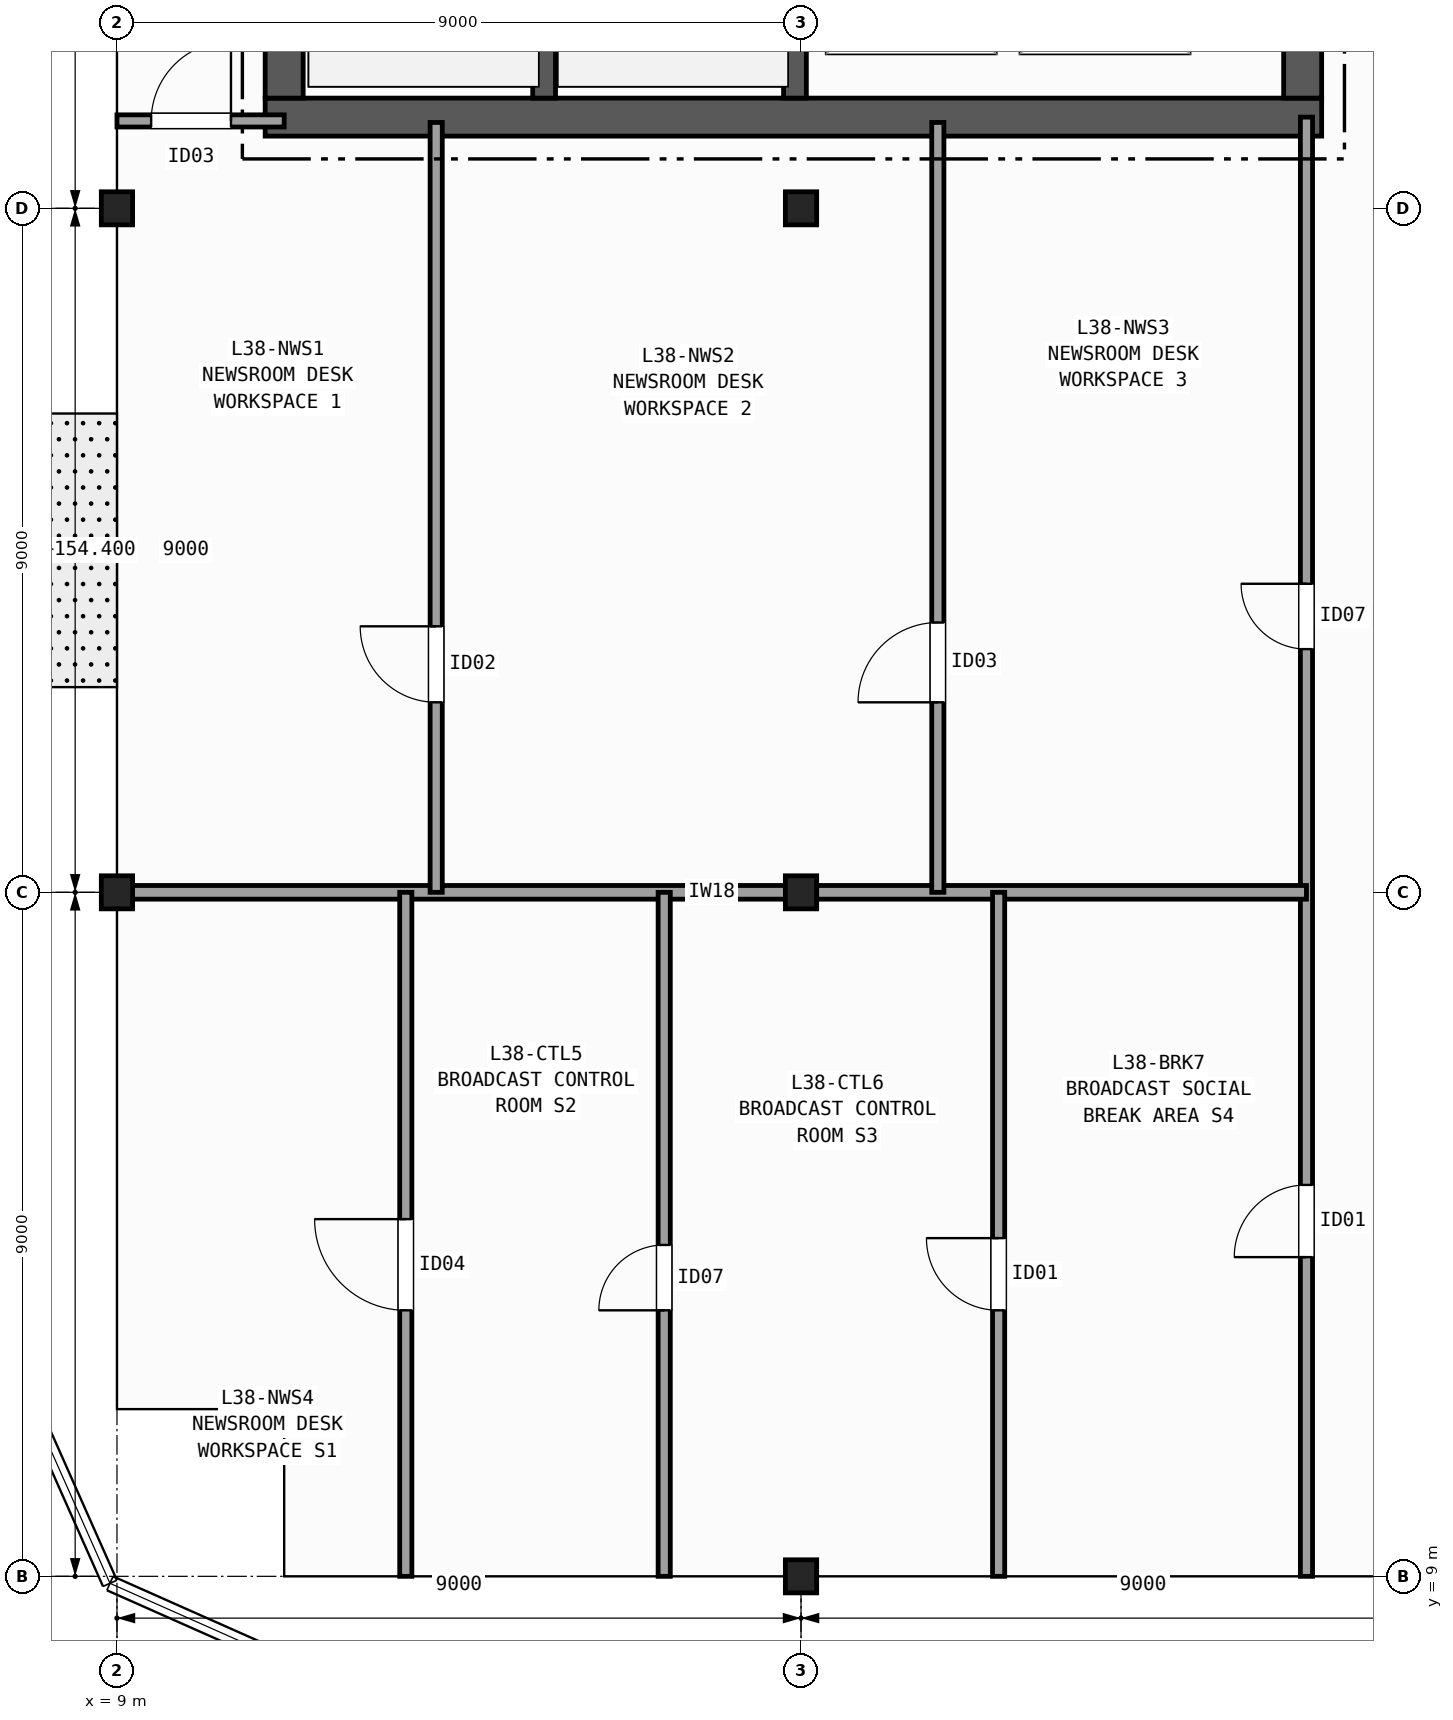
"""IFC4 building model, lengths in metres.
Left out: names, types, materials, properties, quantities, classifications, styles, units other than length and angle.
Written with IfcOpenShell. Run it as: python <this file> out.ifc"""

import sys

from ifc_helpers import new_model, si_unit, direction, frame, frame_2d, origin, origin_2d, place, context, subcontext, project, spatial, rectangle, i_section, extrude, element, fill, save


model = new_model("IFC4")
c1 = context("Model", 3, precision=1e-05, world=origin(), true_north=direction((0.0, 1.0)))
c2 = subcontext(c1, "Body", "Model", "MODEL_VIEW")
j1 = project(units=[si_unit("LENGTHUNIT", "METRE"), si_unit("PLANEANGLEUNIT", "RADIAN")], contexts=[c1])
p1 = place(None, origin())
s1 = spatial("IfcSite", under=j1, at=p1, CompositionType="ELEMENT")
p2 = place(p1, origin())
s2 = spatial("IfcBuilding", under=s1, at=p2, CompositionType="ELEMENT")
p3 = place(p2, frame((0.0, 0.0, 154.4)))
s3 = spatial("IfcBuildingStorey", under=s2, at=p3, CompositionType="ELEMENT", Elevation=154.4)
for number, where, z_axis, x_axis in (
    (1, (9.0, 18.0, 0.0), (0.0, 0.0, 1.0), (1.0, 0.0, 0.0)),
    (2, (9.0, 27.0, 0.0), (0.0, 0.0, 1.0), (1.0, 0.0, 0.0)),
    (3, (18.0, 9.0, 0.0), (0.0, 0.0, 1.0), (1.0, 0.0, 0.0)),
    (4, (18.0, 18.0, 0.0), (0.0, 0.0, 1.0), (1.0, 0.0, 0.0)),
    (5, (18.0, 27.0, 0.0), (0.0, 0.0, 1.0), (1.0, 0.0, 0.0)),
):
    element("IfcColumn", number, at=place(p3, frame(where, z_axis=z_axis, x_axis=x_axis)), inside=s3, PredefinedType="COLUMN", context=c2, shape_type="SweptSolid", body=[
        extrude(i_section(OverallWidth=0.412, OverallDepth=0.435, WebThickness=0.036, FlangeThickness=0.057, FilletRadius=0.015, at=origin_2d()), origin(), (0.0, 0.0, 1.0), 3.7),
    ])
p4 = place(p3, frame((10.95, 28.2, 0.0), z_axis=(0.0, 0.0, 1.0), x_axis=(1.0, 0.0, 0.0)))
e6 = element("IfcWall", 6, at=p4, inside=s3, PredefinedType="SHEAR", context=c2, shape_type="SweptSolid", body=[
    extrude(rectangle(XDim=13.9, YDim=0.5, at=frame_2d((6.95, 0.0))), origin(), (0.0, 0.0, 1.0), 3.42),
])
p5 = place(p3, frame((11.2, 42.15, 0.0), z_axis=(0.0, 0.0, 1.0), x_axis=(0.0, -1.0, 0.0)))
e7 = element("IfcWall", 7, at=p5, inside=s3, PredefinedType="SHEAR", context=c2, shape_type="SweptSolid", body=[
    extrude(rectangle(XDim=13.7, YDim=0.5, at=frame_2d((6.85, 0.0))), origin(), (0.0, 0.0, 1.0), 3.42),
])
p6 = place(p3, frame((24.6, 28.45, 0.0), z_axis=(0.0, 0.0, 1.0), x_axis=(0.0, 1.0, 0.0)))
e8 = element("IfcWall", 8, at=p6, inside=s3, PredefinedType="SHEAR", context=c2, shape_type="SweptSolid", body=[
    extrude(rectangle(XDim=13.7, YDim=0.5, at=frame_2d((6.85, 0.0))), origin(), (0.0, 0.0, 1.0), 3.42),
])
p7 = place(p6, frame((3.35, 0.0, 0.0)))
e9 = element("IfcOpeningElement", 9, at=p7, cuts=e8, PredefinedType="OPENING", context=c2, shape_type="SweptSolid", body=[
    extrude(rectangle(XDim=1.5, YDim=2.2, at=frame_2d((0.75, 1.1))), frame((0.0, 0.26, 0.0), z_axis=(0.0, -1.0, 0.0), x_axis=(1.0, 0.0, 0.0)), (0.0, 0.0, 1.0), 0.52),
])
p8 = place(p6, frame((9.95, 0.0, 0.0)))
e10 = element("IfcOpeningElement", 10, at=p8, cuts=e8, PredefinedType="OPENING", context=c2, shape_type="SweptSolid", body=[
    extrude(rectangle(XDim=0.9, YDim=2.1, at=frame_2d((0.45, 1.05))), frame((0.0, 0.26, 0.0), z_axis=(0.0, -1.0, 0.0), x_axis=(1.0, 0.0, 0.0)), (0.0, 0.0, 1.0), 0.52),
])
p9 = place(p6, frame((12.05, 0.0, 0.0)))
e11 = element("IfcOpeningElement", 11, at=p9, cuts=e8, PredefinedType="OPENING", context=c2, shape_type="SweptSolid", body=[
    extrude(rectangle(XDim=0.9, YDim=2.1, at=frame_2d((0.45, 1.05))), frame((0.0, 0.26, 0.0), z_axis=(0.0, -1.0, 0.0), x_axis=(1.0, 0.0, 0.0)), (0.0, 0.0, 1.0), 0.52),
])
p10 = place(p3, frame((14.62, 28.45, 0.0), z_axis=(0.0, 0.0, 1.0), x_axis=(0.0, 1.0, 0.0)))
e12 = element("IfcWall", 12, at=p10, inside=s3, PredefinedType="SHEAR", context=c2, shape_type="SweptSolid", body=[
    extrude(rectangle(XDim=9.0, YDim=0.3, at=frame_2d((4.5, 0.0))), origin(), (0.0, 0.0, 1.0), 3.42),
])
p11 = place(p3, frame((17.92, 42.15, 0.0), z_axis=(0.0, 0.0, 1.0), x_axis=(0.0, -1.0, 0.0)))
e13 = element("IfcWall", 13, at=p11, inside=s3, PredefinedType="SHEAR", context=c2, shape_type="SweptSolid", body=[
    extrude(rectangle(XDim=13.7, YDim=0.3, at=frame_2d((6.85, 0.0))), origin(), (0.0, 0.0, 1.0), 3.42),
])
p12 = place(p11, frame((1.975, 0.0, 0.0)))
e14 = element("IfcOpeningElement", 14, at=p12, cuts=e13, PredefinedType="OPENING", context=c2, shape_type="SweptSolid", body=[
    extrude(rectangle(XDim=1.15, YDim=2.15, at=frame_2d((0.575, 1.075))), frame((0.0, 0.16, 0.0), z_axis=(0.0, -1.0, 0.0), x_axis=(1.0, 0.0, 0.0)), (0.0, 0.0, 1.0), 0.32),
])
p13 = place(p3, frame((9.0, 28.15, 0.0), z_axis=(0.0, 0.0, 1.0), x_axis=(1.0, 0.0, 0.0)))
e15 = element("IfcWall", 15, at=p13, inside=s3, PredefinedType="PARTITIONING", context=c2, shape_type="SweptSolid", body=[
    extrude(rectangle(XDim=2.2, YDim=0.16, at=frame_2d((1.1, 0.0))), origin(), (0.0, 0.0, 1.0), 2.634),
])
p14 = place(p13, frame((0.45, 0.0, 0.0)))
e16 = element("IfcOpeningElement", 16, at=p14, cuts=e15, PredefinedType="OPENING", context=c2, shape_type="SweptSolid", body=[
    extrude(rectangle(XDim=1.05, YDim=2.15, at=frame_2d((0.525, 1.075))), frame((0.0, 0.09, 0.0), z_axis=(0.0, -1.0, 0.0), x_axis=(1.0, 0.0, 0.0)), (0.0, 0.0, 1.0), 0.18),
])
p15 = place(p3, frame((24.65, 9.0, 0.0), z_axis=(0.0, 0.0, 1.0), x_axis=(0.0, 1.0, 0.0)))
e17 = element("IfcWall", 17, at=p15, inside=s3, PredefinedType="PARTITIONING", context=c2, shape_type="SweptSolid", body=[
    extrude(rectangle(XDim=19.2, YDim=0.16, at=frame_2d((9.6, 0.0))), origin(), (0.0, 0.0, 1.0), 2.634),
])
p16 = place(p15, frame((12.2, 0.0, 0.0)))
e18 = element("IfcOpeningElement", 18, at=p16, cuts=e17, PredefinedType="OPENING", context=c2, shape_type="SweptSolid", body=[
    extrude(rectangle(XDim=0.86, YDim=2.05, at=frame_2d((0.43, 1.025))), frame((0.0, 0.09, 0.0), z_axis=(0.0, -1.0, 0.0), x_axis=(1.0, 0.0, 0.0)), (0.0, 0.0, 1.0), 0.18),
])
p17 = place(p15, frame((4.2, 0.0, 0.0)))
e19 = element("IfcOpeningElement", 19, at=p17, cuts=e17, PredefinedType="OPENING", context=c2, shape_type="SweptSolid", body=[
    extrude(rectangle(XDim=0.95, YDim=2.1, at=frame_2d((0.475, 1.05))), frame((0.0, 0.09, 0.0), z_axis=(0.0, -1.0, 0.0), x_axis=(1.0, 0.0, 0.0)), (0.0, 0.0, 1.0), 0.18),
])
p18 = place(p3, frame((9.0, 18.0, 0.0), z_axis=(0.0, 0.0, 1.0), x_axis=(1.0, 0.0, 0.0)))
e20 = element("IfcWall", 20, at=p18, inside=s3, PredefinedType="PARTITIONING", context=c2, shape_type="SweptSolid", body=[
    extrude(rectangle(XDim=15.65, YDim=0.18, at=frame_2d((7.825, 0.0))), origin(), (0.0, 0.0, 1.0), 2.634),
])
p19 = place(p3, frame((13.2, 18.0, 0.0), z_axis=(0.0, 0.0, 1.0), x_axis=(0.0, 1.0, 0.0)))
e21 = element("IfcWall", 21, at=p19, inside=s3, PredefinedType="PARTITIONING", context=c2, shape_type="SweptSolid", body=[
    extrude(rectangle(XDim=10.13, YDim=0.16, at=frame_2d((5.065, 0.0))), origin(), (0.0, 0.0, 1.0), 2.789),
])
p20 = place(p19, frame((2.5, 0.0, 0.0)))
e22 = element("IfcOpeningElement", 22, at=p20, cuts=e21, PredefinedType="OPENING", context=c2, shape_type="SweptSolid", body=[
    extrude(rectangle(XDim=1.0, YDim=2.1, at=frame_2d((0.5, 1.05))), frame((0.0, 0.09, 0.0), z_axis=(0.0, -1.0, 0.0), x_axis=(1.0, 0.0, 0.0)), (0.0, 0.0, 1.0), 0.18),
])
p21 = place(p3, frame((19.8, 18.0, 0.0), z_axis=(0.0, 0.0, 1.0), x_axis=(0.0, 1.0, 0.0)))
e23 = element("IfcWall", 23, at=p21, inside=s3, PredefinedType="PARTITIONING", context=c2, shape_type="SweptSolid", body=[
    extrude(rectangle(XDim=10.13, YDim=0.16, at=frame_2d((5.065, 0.0))), origin(), (0.0, 0.0, 1.0), 2.789),
])
p22 = place(p21, frame((2.5, 0.0, 0.0)))
e24 = element("IfcOpeningElement", 24, at=p22, cuts=e23, PredefinedType="OPENING", context=c2, shape_type="SweptSolid", body=[
    extrude(rectangle(XDim=1.05, YDim=2.15, at=frame_2d((0.525, 1.075))), frame((0.0, 0.09, 0.0), z_axis=(0.0, -1.0, 0.0), x_axis=(1.0, 0.0, 0.0)), (0.0, 0.0, 1.0), 0.18),
])
p23 = place(p3, frame((12.8, 9.0, 0.0), z_axis=(0.0, 0.0, 1.0), x_axis=(0.0, 1.0, 0.0)))
e25 = element("IfcWall", 25, at=p23, inside=s3, PredefinedType="PARTITIONING", context=c2, shape_type="SweptSolid", body=[
    extrude(rectangle(XDim=9.0, YDim=0.16, at=frame_2d((4.5, 0.0))), origin(), (0.0, 0.0, 1.0), 2.789),
])
p24 = place(p23, frame((3.5, 0.0, 0.0)))
e26 = element("IfcOpeningElement", 26, at=p24, cuts=e25, PredefinedType="OPENING", context=c2, shape_type="SweptSolid", body=[
    extrude(rectangle(XDim=1.2, YDim=2.15, at=frame_2d((0.6, 1.075))), frame((0.0, 0.09, 0.0), z_axis=(0.0, -1.0, 0.0), x_axis=(1.0, 0.0, 0.0)), (0.0, 0.0, 1.0), 0.18),
])
p25 = place(p3, frame((16.2, 9.0, 0.0), z_axis=(0.0, 0.0, 1.0), x_axis=(0.0, 1.0, 0.0)))
e27 = element("IfcWall", 27, at=p25, inside=s3, PredefinedType="PARTITIONING", context=c2, shape_type="SweptSolid", body=[
    extrude(rectangle(XDim=9.0, YDim=0.16, at=frame_2d((4.5, 0.0))), origin(), (0.0, 0.0, 1.0), 2.789),
])
p26 = place(p25, frame((3.5, 0.0, 0.0)))
e28 = element("IfcOpeningElement", 28, at=p26, cuts=e27, PredefinedType="OPENING", context=c2, shape_type="SweptSolid", body=[
    extrude(rectangle(XDim=0.86, YDim=2.05, at=frame_2d((0.43, 1.025))), frame((0.0, 0.09, 0.0), z_axis=(0.0, -1.0, 0.0), x_axis=(1.0, 0.0, 0.0)), (0.0, 0.0, 1.0), 0.18),
])
p27 = place(p3, frame((20.6, 9.0, 0.0), z_axis=(0.0, 0.0, 1.0), x_axis=(0.0, 1.0, 0.0)))
e29 = element("IfcWall", 29, at=p27, inside=s3, PredefinedType="PARTITIONING", context=c2, shape_type="SweptSolid", body=[
    extrude(rectangle(XDim=9.0, YDim=0.16, at=frame_2d((4.5, 0.0))), origin(), (0.0, 0.0, 1.0), 2.634),
])
p28 = place(p27, frame((3.5, 0.0, 0.0)))
e30 = element("IfcOpeningElement", 30, at=p28, cuts=e29, PredefinedType="OPENING", context=c2, shape_type="SweptSolid", body=[
    extrude(rectangle(XDim=0.95, YDim=2.1, at=frame_2d((0.475, 1.05))), frame((0.0, 0.09, 0.0), z_axis=(0.0, -1.0, 0.0), x_axis=(1.0, 0.0, 0.0)), (0.0, 0.0, 1.0), 0.18),
])
p29 = place(p14, origin())
e31 = element("IfcDoor", 31, at=p29, inside=s3, OperationType="SINGLE_SWING_RIGHT", PredefinedType="DOOR", context=c2, shape_type="SweptSolid", body=[
    extrude(rectangle(XDim=1.05, YDim=2.15, at=frame_2d((0.525, 1.075))), frame((0.0, 0.025, 0.0), z_axis=(0.0, -1.0, 0.0), x_axis=(1.0, 0.0, 0.0)), (0.0, 0.0, 1.0), 0.05),
])
fill(e16, e31)
p30 = place(p16, origin())
e32 = element("IfcDoor", 32, at=p30, inside=s3, OperationType="SINGLE_SWING_RIGHT", PredefinedType="DOOR", context=c2, shape_type="SweptSolid", body=[
    extrude(rectangle(XDim=0.86, YDim=2.05, at=frame_2d((0.43, 1.025))), frame((0.0, 0.025, 0.0), z_axis=(0.0, -1.0, 0.0), x_axis=(1.0, 0.0, 0.0)), (0.0, 0.0, 1.0), 0.05),
])
fill(e18, e32)
p31 = place(p17, origin())
e33 = element("IfcDoor", 33, at=p31, inside=s3, OperationType="SINGLE_SWING_LEFT", PredefinedType="DOOR", context=c2, shape_type="SweptSolid", body=[
    extrude(rectangle(XDim=0.95, YDim=2.1, at=frame_2d((0.475, 1.05))), frame((0.0, 0.025, 0.0), z_axis=(0.0, -1.0, 0.0), x_axis=(1.0, 0.0, 0.0)), (0.0, 0.0, 1.0), 0.05),
])
fill(e19, e33)
p32 = place(p20, origin())
e34 = element("IfcDoor", 34, at=p32, inside=s3, OperationType="SINGLE_SWING_RIGHT", PredefinedType="DOOR", context=c2, shape_type="SweptSolid", body=[
    extrude(rectangle(XDim=1.0, YDim=2.1, at=frame_2d((0.5, 1.05))), frame((0.0, 0.025, 0.0), z_axis=(0.0, -1.0, 0.0), x_axis=(1.0, 0.0, 0.0)), (0.0, 0.0, 1.0), 0.05),
])
fill(e22, e34)
p33 = place(p22, origin())
e35 = element("IfcDoor", 35, at=p33, inside=s3, OperationType="SINGLE_SWING_LEFT", PredefinedType="DOOR", context=c2, shape_type="SweptSolid", body=[
    extrude(rectangle(XDim=1.05, YDim=2.15, at=frame_2d((0.525, 1.075))), frame((0.0, 0.025, 0.0), z_axis=(0.0, -1.0, 0.0), x_axis=(1.0, 0.0, 0.0)), (0.0, 0.0, 1.0), 0.05),
])
fill(e24, e35)
p34 = place(p24, origin())
e36 = element("IfcDoor", 36, at=p34, inside=s3, OperationType="SINGLE_SWING_RIGHT", PredefinedType="DOOR", context=c2, shape_type="SweptSolid", body=[
    extrude(rectangle(XDim=1.2, YDim=2.15, at=frame_2d((0.6, 1.075))), frame((0.0, 0.025, 0.0), z_axis=(0.0, -1.0, 0.0), x_axis=(1.0, 0.0, 0.0)), (0.0, 0.0, 1.0), 0.05),
])
fill(e26, e36)
p35 = place(p26, origin())
e37 = element("IfcDoor", 37, at=p35, inside=s3, OperationType="SINGLE_SWING_LEFT", PredefinedType="DOOR", context=c2, shape_type="SweptSolid", body=[
    extrude(rectangle(XDim=0.86, YDim=2.05, at=frame_2d((0.43, 1.025))), frame((0.0, 0.025, 0.0), z_axis=(0.0, -1.0, 0.0), x_axis=(1.0, 0.0, 0.0)), (0.0, 0.0, 1.0), 0.05),
])
fill(e28, e37)
p36 = place(p28, origin())
e38 = element("IfcDoor", 38, at=p36, inside=s3, OperationType="SINGLE_SWING_RIGHT", PredefinedType="DOOR", context=c2, shape_type="SweptSolid", body=[
    extrude(rectangle(XDim=0.95, YDim=2.1, at=frame_2d((0.475, 1.05))), frame((0.0, 0.025, 0.0), z_axis=(0.0, -1.0, 0.0), x_axis=(1.0, 0.0, 0.0)), (0.0, 0.0, 1.0), 0.05),
])
fill(e30, e38)
save(model, sys.argv[1])
